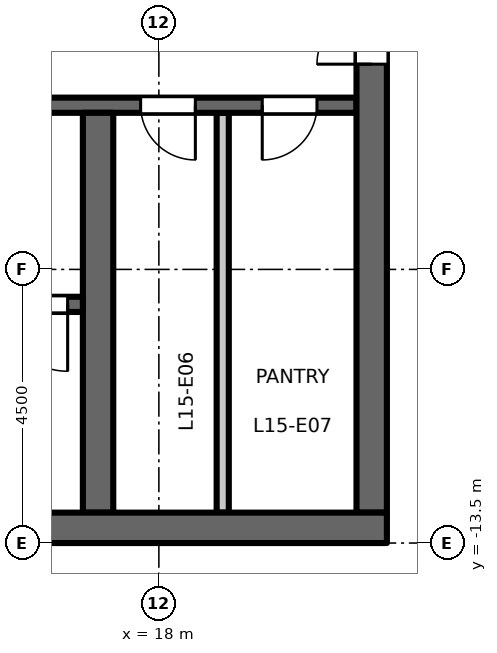
"""IFC4 building model, lengths in metres.
Left out: names, types, materials, properties, quantities, classifications, styles, units other than length and angle.
Written with IfcOpenShell. Run it as: python <this file> out.ifc"""

import sys

from ifc_helpers import new_model, si_unit, direction, frame, frame_2d, origin, place, context, subcontext, project, spatial, rectangle, extrude, element, fill, save


model = new_model("IFC4")
c1 = context("Model", 3, precision=1e-05, world=origin(), true_north=direction((0.0, 1.0)))
c2 = subcontext(c1, "Body", "Model", "MODEL_VIEW")
j1 = project(units=[si_unit("LENGTHUNIT", "METRE"), si_unit("PLANEANGLEUNIT", "RADIAN")], contexts=[c1])
p1 = place(None, origin())
s1 = spatial("IfcSite", under=j1, at=p1, CompositionType="ELEMENT")
p2 = place(p1, origin())
s2 = spatial("IfcBuilding", under=s1, at=p2, CompositionType="ELEMENT")
p3 = place(p2, frame((0.0, 0.0, 71.7)))
s3 = spatial("IfcBuildingStorey", under=s2, at=p3, CompositionType="ELEMENT", Elevation=71.7)
p4 = place(p3, frame((12.15, -6.3, 0.0), z_axis=(0.0, 0.0, 1.0), x_axis=(1.0, 0.0, 0.0)))
e1 = element("IfcWall", 1, at=p4, inside=s3, PredefinedType="SHEAR", context=c2, shape_type="SweptSolid", body=[
    extrude(rectangle(XDim=9.1, YDim=0.25, at=frame_2d((4.55, 0.0))), origin(), (0.0, 0.0, 1.0), 4.35),
])
p5 = place(p4, frame((1.8, 0.0, 0.0)))
e2 = element("IfcOpeningElement", 2, at=p5, cuts=e1, PredefinedType="OPENING", context=c2, shape_type="SweptSolid", body=[
    extrude(rectangle(XDim=1.0, YDim=2.1, at=frame_2d((0.5, 1.05))), frame((0.0, 0.135, 0.0), z_axis=(0.0, -1.0, 0.0), x_axis=(1.0, 0.0, 0.0)), (0.0, 0.0, 1.0), 0.27),
])
p6 = place(p4, frame((5.55, 0.0, 0.0)))
e3 = element("IfcOpeningElement", 3, at=p6, cuts=e1, PredefinedType="OPENING", context=c2, shape_type="SweptSolid", body=[
    extrude(rectangle(XDim=0.9, YDim=2.1, at=frame_2d((0.45, 1.05))), frame((0.0, 0.135, 0.0), z_axis=(0.0, -1.0, 0.0), x_axis=(1.0, 0.0, 0.0)), (0.0, 0.0, 1.0), 0.27),
])
p7 = place(p4, frame((7.55, 0.0, 0.0)))
e4 = element("IfcOpeningElement", 4, at=p7, cuts=e1, PredefinedType="OPENING", context=c2, shape_type="SweptSolid", body=[
    extrude(rectangle(XDim=0.9, YDim=2.1, at=frame_2d((0.45, 1.05))), frame((0.0, 0.135, 0.0), z_axis=(0.0, -1.0, 0.0), x_axis=(1.0, 0.0, 0.0)), (0.0, 0.0, 1.0), 0.27),
])
p8 = place(p3, frame((21.5, -13.0, 0.0), z_axis=(0.0, 0.0, 1.0), x_axis=(0.0, 1.0, 0.0)))
e5 = element("IfcWall", 5, at=p8, inside=s3, PredefinedType="SHEAR", context=c2, shape_type="SweptSolid", body=[
    extrude(rectangle(XDim=26.0, YDim=0.5, at=frame_2d((13.0, 0.0))), origin(), (0.0, 0.0, 1.0), 4.35),
])
p9 = place(p8, frame((16.825, 0.0, 0.0)))
e6 = element("IfcOpeningElement", 6, at=p9, cuts=e5, PredefinedType="OPENING", context=c2, shape_type="SweptSolid", body=[
    extrude(rectangle(XDim=1.8, YDim=2.1, at=frame_2d((0.9, 1.05))), frame((0.0, 0.26, 0.0), z_axis=(0.0, -1.0, 0.0), x_axis=(1.0, 0.0, 0.0)), (0.0, 0.0, 1.0), 0.52),
])
p10 = place(p8, frame((7.375, 0.0, 0.0)))
e7 = element("IfcOpeningElement", 7, at=p10, cuts=e5, PredefinedType="OPENING", context=c2, shape_type="SweptSolid", body=[
    extrude(rectangle(XDim=1.8, YDim=2.1, at=frame_2d((0.9, 1.05))), frame((0.0, 0.26, 0.0), z_axis=(0.0, -1.0, 0.0), x_axis=(1.0, 0.0, 0.0)), (0.0, 0.0, 1.0), 0.52),
])
p11 = place(p8, frame((23.8, 0.0, 0.0)))
e8 = element("IfcOpeningElement", 8, at=p11, cuts=e5, PredefinedType="OPENING", context=c2, shape_type="SweptSolid", body=[
    extrude(rectangle(XDim=0.9, YDim=2.1, at=frame_2d((0.45, 1.05))), frame((0.0, 0.26, 0.0), z_axis=(0.0, -1.0, 0.0), x_axis=(1.0, 0.0, 0.0)), (0.0, 0.0, 1.0), 0.52),
])
p12 = place(p3, frame((19.05, -13.0, 0.0), z_axis=(0.0, 0.0, 1.0), x_axis=(0.0, 1.0, 0.0)))
e9 = element("IfcWall", 9, at=p12, inside=s3, PredefinedType="PARTITIONING", context=c2, shape_type="SweptSolid", body=[
    extrude(rectangle(XDim=6.575, YDim=0.2, at=frame_2d((3.288, 0.0))), origin(), (0.0, 0.0, 1.0), 4.35),
])
p13 = place(p3, frame((17.0, -13.0, 0.0), z_axis=(0.0, 0.0, 1.0), x_axis=(0.0, 1.0, 0.0)))
e10 = element("IfcWall", 10, at=p13, inside=s3, PredefinedType="SHEAR", context=c2, shape_type="SweptSolid", body=[
    extrude(rectangle(XDim=6.575, YDim=0.5, at=frame_2d((3.288, 0.0))), origin(), (0.0, 0.0, 1.0), 4.35),
])
p14 = place(p3, frame((8.75, -9.575, 0.0), z_axis=(0.0, 0.0, 1.0), x_axis=(1.0, 0.0, 0.0)))
e11 = element("IfcWall", 11, at=p14, inside=s3, PredefinedType="SHEAR", context=c2, shape_type="SweptSolid", body=[
    extrude(rectangle(XDim=8.0, YDim=0.25, at=frame_2d((4.0, 0.0))), origin(), (0.0, 0.0, 1.0), 4.35),
])
p15 = place(p14, frame((6.65, 0.0, 0.0)))
e12 = element("IfcOpeningElement", 12, at=p15, cuts=e11, PredefinedType="OPENING", context=c2, shape_type="SweptSolid", body=[
    extrude(rectangle(XDim=1.1, YDim=2.1, at=frame_2d((0.55, 1.05))), frame((0.0, 0.135, 0.0), z_axis=(0.0, -1.0, 0.0), x_axis=(1.0, 0.0, 0.0)), (0.0, 0.0, 1.0), 0.27),
])
p16 = place(p3, frame((8.25, -13.25, 0.0), z_axis=(0.0, 0.0, 1.0), x_axis=(1.0, 0.0, 0.0)))
e13 = element("IfcWall", 13, at=p16, inside=s3, PredefinedType="SHEAR", context=c2, shape_type="SweptSolid", body=[
    extrude(rectangle(XDim=13.5, YDim=0.5, at=frame_2d((6.75, 0.0))), origin(), (0.0, 0.0, 1.0), 4.35),
])
p17 = place(p15, origin())
e14 = element("IfcDoor", 14, at=p17, inside=s3, OperationType="SINGLE_SWING_RIGHT", PredefinedType="DOOR", context=c2, shape_type="SweptSolid", body=[
    extrude(rectangle(XDim=1.1, YDim=2.1, at=frame_2d((0.55, 1.05))), frame((0.0, 0.025, 0.0), z_axis=(0.0, -1.0, 0.0), x_axis=(1.0, 0.0, 0.0)), (0.0, 0.0, 1.0), 0.05),
])
fill(e12, e14)
p18 = place(p10, origin())
e15 = element("IfcDoor", 15, at=p18, inside=s3, OperationType="DOUBLE_DOOR_DOUBLE_SWING", PredefinedType="DOOR", context=c2, shape_type="SweptSolid", body=[
    extrude(rectangle(XDim=1.8, YDim=2.1, at=frame_2d((0.9, 1.05))), frame((0.0, 0.025, 0.0), z_axis=(0.0, -1.0, 0.0), x_axis=(1.0, 0.0, 0.0)), (0.0, 0.0, 1.0), 0.05),
])
fill(e7, e15)
p19 = place(p6, origin())
e16 = element("IfcDoor", 16, at=p19, inside=s3, OperationType="SINGLE_SWING_RIGHT", PredefinedType="DOOR", context=c2, shape_type="SweptSolid", body=[
    extrude(rectangle(XDim=0.9, YDim=2.1, at=frame_2d((0.45, 1.05))), frame((0.0, 0.025, 0.0), z_axis=(0.0, -1.0, 0.0), x_axis=(1.0, 0.0, 0.0)), (0.0, 0.0, 1.0), 0.05),
])
fill(e3, e16)
p20 = place(p7, origin())
e17 = element("IfcDoor", 17, at=p20, inside=s3, OperationType="SINGLE_SWING_LEFT", PredefinedType="DOOR", context=c2, shape_type="SweptSolid", body=[
    extrude(rectangle(XDim=0.9, YDim=2.1, at=frame_2d((0.45, 1.05))), frame((0.0, 0.025, 0.0), z_axis=(0.0, -1.0, 0.0), x_axis=(1.0, 0.0, 0.0)), (0.0, 0.0, 1.0), 0.05),
])
fill(e4, e17)
save(model, sys.argv[1])
